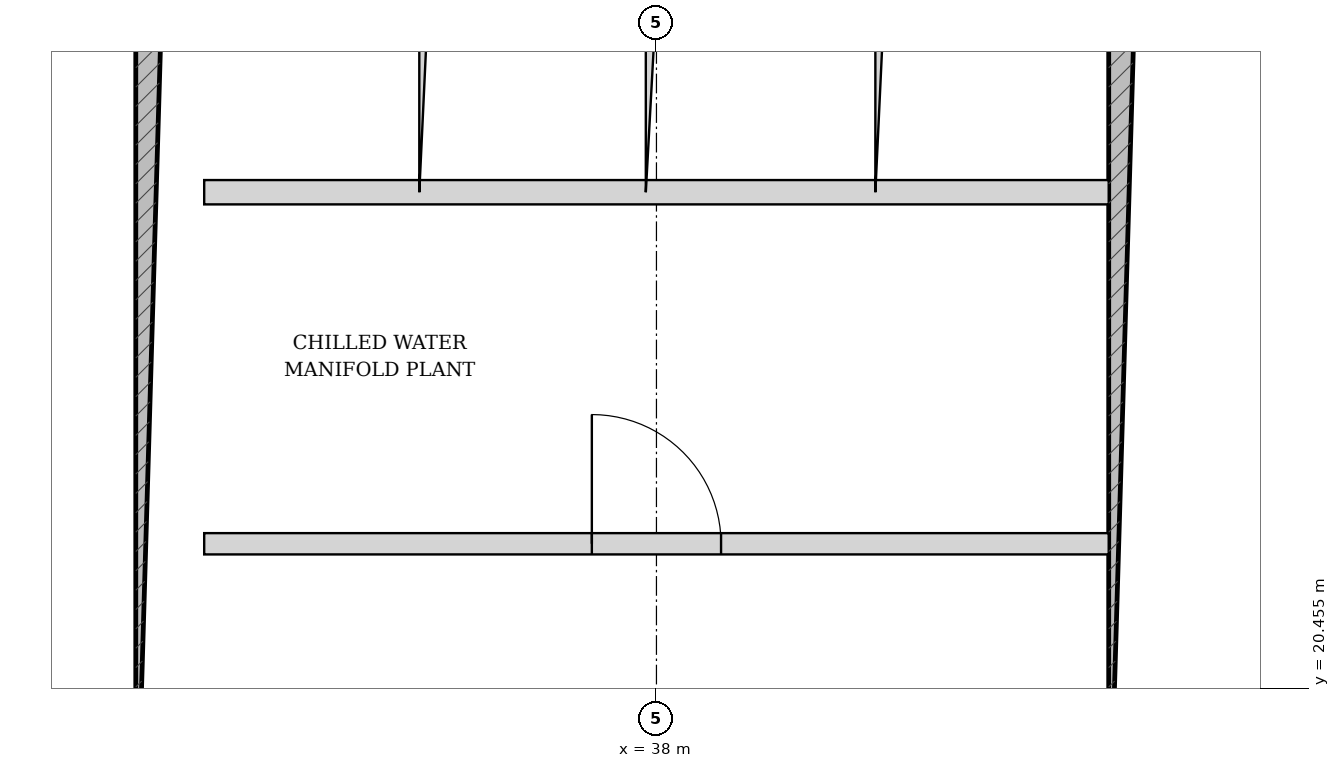
"""IFC4 building model, lengths in metres.
Left out: names, types, materials, properties, quantities, classifications, styles, units other than length and angle.
Written with IfcOpenShell. Run it as: python <this file> out.ifc"""

import sys

from ifc_helpers import new_model, si_unit, direction, frame, frame_2d, origin, place, context, subcontext, project, spatial, rectangle, extrude, source, transform, mapped, element, fill, save


model = new_model("IFC4")
c1 = context("Model", 3, precision=1e-05, world=origin(), true_north=direction((-0.2419218956, 0.970295726276)))
c2 = subcontext(c1, "Body", "Model", "MODEL_VIEW")
j1 = project(units=[si_unit("LENGTHUNIT", "METRE"), si_unit("PLANEANGLEUNIT", "RADIAN")], contexts=[c1])
p1 = place(None, origin())
s1 = spatial("IfcSite", under=j1, at=p1, CompositionType="ELEMENT")
p2 = place(p1, origin())
s2 = spatial("IfcBuilding", under=s1, at=p2, CompositionType="ELEMENT")
p3 = place(p2, frame((0.0, 0.0, 27.6)))
s3 = spatial("IfcBuildingStorey", under=s2, at=p3, CompositionType="ELEMENT", Elevation=27.6)
p4 = place(p3, frame((34.8, 19.175, 0.0), z_axis=(0.0, 0.0, 1.0), x_axis=(0.0, 1.0, 0.0)))
e1 = element("IfcWall", 1, at=p4, inside=s3, PredefinedType="SHEAR", context=c2, shape_type="SweptSolid", body=[
    extrude(rectangle(XDim=15.25, YDim=0.45, at=frame_2d((7.625, 0.0))), origin(), (0.0, 0.0, 1.0), 3.32),
])
p5 = place(p4, frame((7.8, 0.0, 0.0)))
e2 = element("IfcOpeningElement", 2, at=p5, cuts=e1, PredefinedType="OPENING", context=c2, shape_type="SweptSolid", body=[
    extrude(rectangle(XDim=1.05, YDim=2.15, at=frame_2d((0.525, 1.075))), frame((0.0, 0.235, 0.0), z_axis=(0.0, -1.0, 0.0), x_axis=(1.0, 0.0, 0.0)), (0.0, 0.0, 1.0), 0.47),
])
p6 = place(p3, frame((41.2, 19.175, 0.0), z_axis=(0.0, 0.0, 1.0), x_axis=(0.0, 1.0, 0.0)))
e3 = element("IfcWall", 3, at=p6, inside=s3, PredefinedType="SHEAR", context=c2, shape_type="SweptSolid", body=[
    extrude(rectangle(XDim=15.25, YDim=0.45, at=frame_2d((7.625, 0.0))), origin(), (0.0, 0.0, 1.0), 3.32),
])
p7 = place(p6, frame((7.8, 0.0, 0.0)))
e4 = element("IfcOpeningElement", 4, at=p7, cuts=e3, PredefinedType="OPENING", context=c2, shape_type="SweptSolid", body=[
    extrude(rectangle(XDim=1.05, YDim=2.15, at=frame_2d((0.525, 1.075))), frame((0.0, 0.235, 0.0), z_axis=(0.0, -1.0, 0.0), x_axis=(1.0, 0.0, 0.0)), (0.0, 0.0, 1.0), 0.47),
])
p8 = place(p3, frame((35.025, 23.72, 0.0), z_axis=(0.0, 0.0, 1.0), x_axis=(1.0, 0.0, 0.0)))
e5 = element("IfcWall", 5, at=p8, inside=s3, PredefinedType="PARTITIONING", context=c2, shape_type="SweptSolid", body=[
    extrude(rectangle(XDim=5.95, YDim=0.16, at=frame_2d((2.975, 0.0))), origin(), (0.0, 0.0, 1.0), 3.32),
])
p9 = place(p3, frame((36.5, 23.72, 0.0), z_axis=(0.0, 0.0, 1.0), x_axis=(0.0, 1.0, 0.0)))
e6 = element("IfcWall", 6, at=p9, inside=s3, PredefinedType="PARTITIONING", context=c2, shape_type="SweptSolid", body=[
    extrude(rectangle(XDim=2.56, YDim=0.12, at=frame_2d((1.28, 0.0))), origin(), (0.0, 0.0, 1.0), 3.32),
])
p10 = place(p3, frame((38.0, 23.72, 0.0), z_axis=(0.0, 0.0, 1.0), x_axis=(0.0, 1.0, 0.0)))
e7 = element("IfcWall", 7, at=p10, inside=s3, PredefinedType="PARTITIONING", context=c2, shape_type="SweptSolid", body=[
    extrude(rectangle(XDim=2.56, YDim=0.14, at=frame_2d((1.28, 0.0))), origin(), (0.0, 0.0, 1.0), 3.32),
])
p11 = place(p3, frame((39.5, 23.72, 0.0), z_axis=(0.0, 0.0, 1.0), x_axis=(0.0, 1.0, 0.0)))
e8 = element("IfcWall", 8, at=p11, inside=s3, PredefinedType="PARTITIONING", context=c2, shape_type="SweptSolid", body=[
    extrude(rectangle(XDim=2.56, YDim=0.12, at=frame_2d((1.28, 0.0))), origin(), (0.0, 0.0, 1.0), 3.32),
])
p12 = place(p3, frame((35.025, 21.407, 0.0), z_axis=(0.0, 0.0, 1.0), x_axis=(1.0, 0.0, 0.0)))
e9 = element("IfcWall", 9, at=p12, inside=s3, PredefinedType="PARTITIONING", context=c2, shape_type="SweptSolid", body=[
    extrude(rectangle(XDim=5.95, YDim=0.14, at=frame_2d((2.975, 0.0))), origin(), (0.0, 0.0, 1.0), 3.32),
])
p13 = place(p12, frame((2.55, 0.0, 0.0)))
e10 = element("IfcOpeningElement", 10, at=p13, cuts=e9, PredefinedType="OPENING", context=c2, shape_type="SweptSolid", body=[
    extrude(rectangle(XDim=0.85, YDim=2.1, at=frame_2d((0.425, 1.05))), frame((0.0, 0.08, 0.0), z_axis=(0.0, -1.0, 0.0), x_axis=(1.0, 0.0, 0.0)), (0.0, 0.0, 1.0), 0.16),
])
m1 = source(origin(), c2, "Body", "SweptSolid", [
    extrude(rectangle(XDim=0.85, YDim=2.1, at=frame_2d((0.425, 1.05))), frame((0.0, 0.025, 0.0), z_axis=(0.0, -1.0, 0.0), x_axis=(1.0, 0.0, 0.0)), (0.0, 0.0, 1.0), 0.05),
])
p14 = place(p13, origin())
e11 = element("IfcDoor", 11, at=p14, inside=s3, OperationType="SINGLE_SWING_LEFT", PredefinedType="DOOR", context=c2, shape_type="MappedRepresentation", body=[
    mapped(m1, transform((0.0, 0.0, 0.0), scale=1.0)),
])
fill(e10, e11)
save(model, sys.argv[1])
